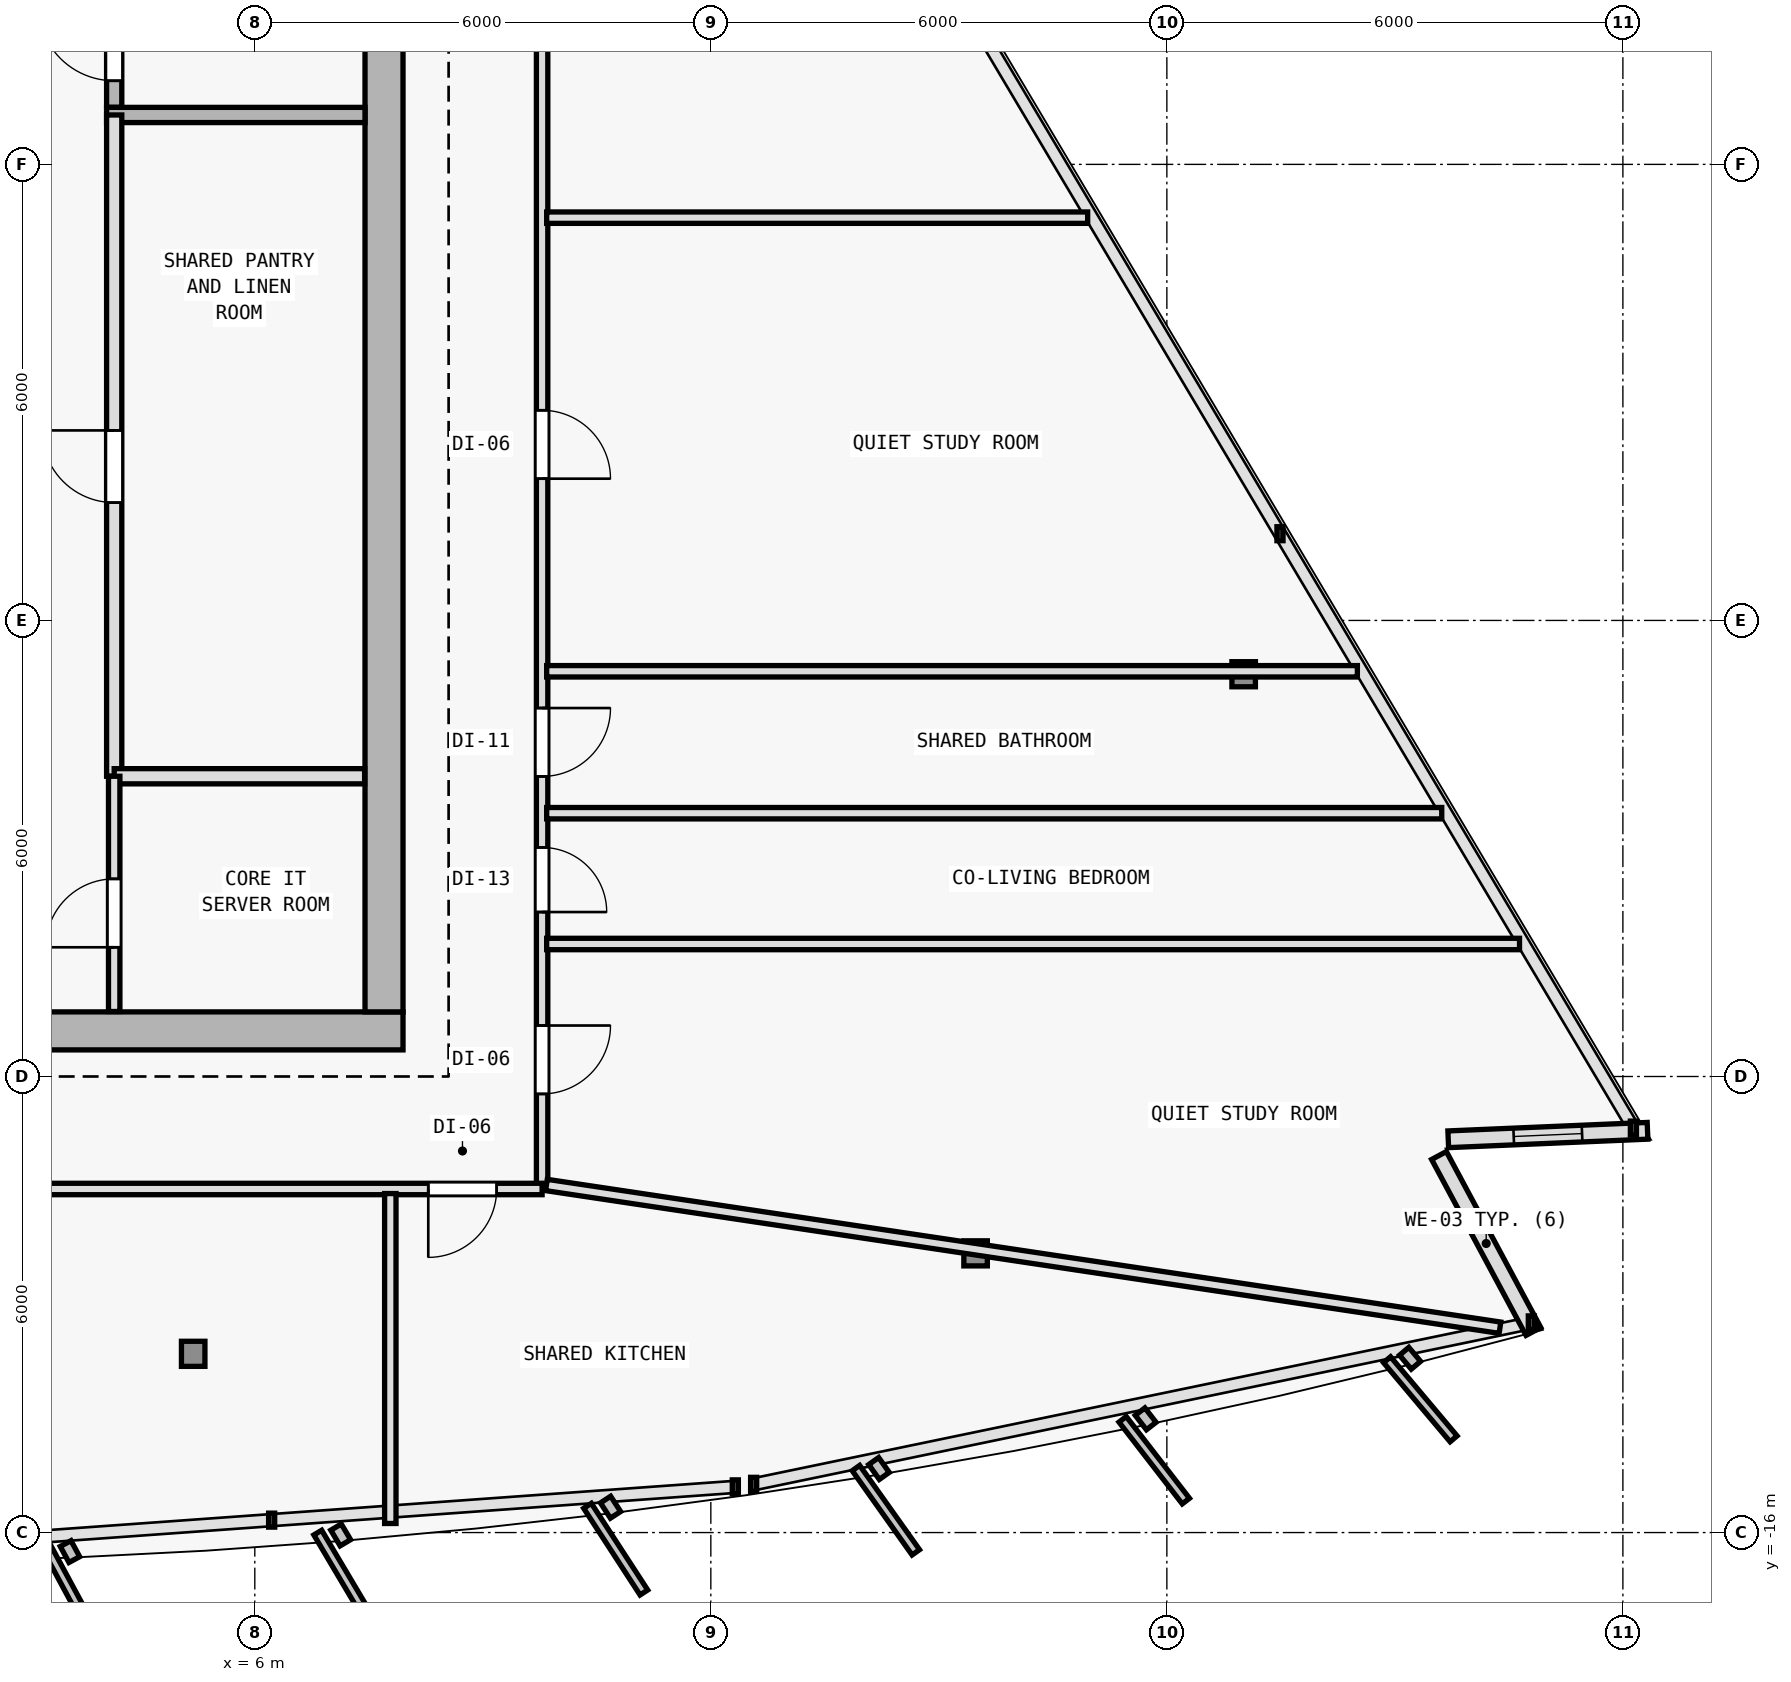
"""IFC4 building model, lengths in metres.
Left out: names, types, materials, properties, quantities, classifications, styles, units other than length and angle.
Written with IfcOpenShell. Run it as: python <this file> out.ifc"""

import sys

from ifc_helpers import new_model, si_unit, direction, frame, frame_2d, origin, origin_2d, place, context, subcontext, project, spatial, rectangle, i_section, extrude, element, fill, save


model = new_model("IFC4")
c1 = context("Model", 3, precision=1e-05, world=origin(), true_north=direction((0.0, 1.0)))
c2 = subcontext(c1, "Body", "Model", "MODEL_VIEW")
j1 = project(units=[si_unit("LENGTHUNIT", "METRE"), si_unit("PLANEANGLEUNIT", "RADIAN")], contexts=[c1])
p1 = place(None, origin())
s1 = spatial("IfcSite", under=j1, at=p1, CompositionType="ELEMENT")
p2 = place(p1, origin())
s2 = spatial("IfcBuilding", under=s1, at=p2, CompositionType="ELEMENT")
p3 = place(p2, frame((0.0, 0.0, 272.4)))
s3 = spatial("IfcBuildingStorey", under=s2, at=p3, CompositionType="ELEMENT", Elevation=272.4)
for number, where, z_axis, x_axis in (
    (1, (7.7, -9.4, 0.0), (0.0, 0.0, 1.0), (1.0, 0.0, 0.0)),
    (2, (7.7, 0.4, 0.0), (0.0, 0.0, 1.0), (1.0, 0.0, 0.0)),
):
    element("IfcColumn", number, at=place(p3, frame(where, z_axis=z_axis, x_axis=x_axis)), inside=s3, PredefinedType="COLUMN", context=c2, shape_type="SweptSolid", body=[
        extrude(i_section(OverallWidth=0.374, OverallDepth=0.372, WebThickness=0.012, FlangeThickness=0.02, FilletRadius=0.015, at=origin_2d()), origin(), (0.0, 0.0, 1.0), 3.6),
    ])
p4 = place(p3, frame((5.189, -13.648, 0.006), z_axis=(-0.006866308162, 0.0352833063, 0.999353762243), x_axis=(-0.981585848295, -0.191021523464, 0.0)))
e3 = element("IfcColumn", 3, at=p4, inside=s3, PredefinedType="COLUMN", context=c2, shape_type="SweptSolid", body=[
    extrude(i_section(OverallWidth=0.309, OverallDepth=0.33, WebThickness=0.011, FlangeThickness=0.019, FilletRadius=0.027, at=origin_2d()), origin(), (0.0, 0.0, 1.0), 3.591),
])
p5 = place(p3, frame((15.483, -12.327, 0.006), z_axis=(-0.020596292833, 0.033511459955, 0.999226087917), x_axis=(-0.851954850327, -0.523615252838, 0.0)))
e4 = element("IfcColumn", 4, at=p5, inside=s3, PredefinedType="COLUMN", context=c2, shape_type="SweptSolid", body=[
    extrude(i_section(OverallWidth=0.309, OverallDepth=0.33, WebThickness=0.011, FlangeThickness=0.019, FilletRadius=0.027, at=origin_2d()), origin(), (0.0, 0.0, 1.0), 3.592),
])
p6 = place(p3, frame((19.01, -4.708, 0.006), z_axis=(-0.026107436898, 0.021620221181, 0.999425318758), x_axis=(-0.637813971185, -0.770190455771, 0.0)))
e5 = element("IfcColumn", 5, at=p6, inside=s3, PredefinedType="COLUMN", context=c2, shape_type="SweptSolid", body=[
    extrude(i_section(OverallWidth=0.309, OverallDepth=0.33, WebThickness=0.011, FlangeThickness=0.019, FilletRadius=0.027, at=origin_2d()), origin(), (0.0, 0.0, 1.0), 3.591),
])
p7 = place(p3, frame((21.581, -11.04, 0.0), z_axis=(0.0, 0.0, 1.0), x_axis=(0.472791303324, -0.881174434208, 0.0)))
e6 = element("IfcWall", 6, at=p7, inside=s3, PredefinedType="SOLIDWALL", context=c2, shape_type="SweptSolid", body=[
    extrude(rectangle(XDim=2.627, YDim=0.22, at=frame_2d((1.313, 0.0))), origin(), (0.0, 0.0, 1.0), 3.35),
])
p8 = place(p3, frame((24.324, -10.714, 0.0), z_axis=(0.0, 0.0, 1.0), x_axis=(-0.999095924753, -0.042512740932, 0.0)))
e7 = element("IfcWall", 7, at=p8, inside=s3, PredefinedType="SOLIDWALL", context=c2, shape_type="SweptSolid", body=[
    extrude(rectangle(XDim=2.625, YDim=0.22, at=frame_2d((1.312, 0.0))), origin(), (0.0, 0.0, 1.0), 3.35),
])
p9 = place(p8, frame((0.862, 0.0, 0.62)))
e8 = element("IfcOpeningElement", 8, at=p9, cuts=e7, PredefinedType="OPENING", context=c2, shape_type="SweptSolid", body=[
    extrude(rectangle(XDim=0.9, YDim=1.6, at=frame_2d((0.45, 0.8))), frame((0.0, 0.12, 0.0), z_axis=(0.0, -1.0, 0.0), x_axis=(1.0, 0.0, 0.0)), (0.0, 0.0, 1.0), 0.24),
])
p10 = place(p3, frame((-7.95, -9.4, 0.0), z_axis=(0.0, 0.0, 1.0), x_axis=(1.0, 0.0, 0.0)))
e9 = element("IfcWall", 9, at=p10, inside=s3, PredefinedType="SHEAR", context=c2, shape_type="SweptSolid", body=[
    extrude(rectangle(XDim=15.9, YDim=0.5, at=frame_2d((7.95, 0.0))), origin(), (0.0, 0.0, 1.0), 3.35),
])
p11 = place(p10, frame((9.6, 0.0, 0.0)))
e10 = element("IfcOpeningElement", 10, at=p11, cuts=e9, PredefinedType="OPENING", context=c2, shape_type="SweptSolid", body=[
    extrude(rectangle(XDim=1.5, YDim=2.2, at=frame_2d((0.75, 1.1))), frame((0.0, 0.26, 0.0), z_axis=(0.0, -1.0, 0.0), x_axis=(1.0, 0.0, 0.0)), (0.0, 0.0, 1.0), 0.52),
])
p12 = place(p3, frame((7.7, 9.95, 0.0), z_axis=(0.0, 0.0, 1.0), x_axis=(0.0, -1.0, 0.0)))
e11 = element("IfcWall", 11, at=p12, inside=s3, PredefinedType="SHEAR", context=c2, shape_type="SweptSolid", body=[
    extrude(rectangle(XDim=19.1, YDim=0.5, at=frame_2d((9.55, 0.0))), origin(), (0.0, 0.0, 1.0), 3.35),
])
p13 = place(p3, frame((4.15, 2.75, 0.0), z_axis=(0.0, 0.0, 1.0), x_axis=(0.0, 1.0, 0.0)))
e12 = element("IfcWall", 12, at=p13, inside=s3, PredefinedType="SOLIDWALL", context=c2, shape_type="SweptSolid", body=[
    extrude(rectangle(XDim=7.2, YDim=0.2, at=frame_2d((3.6, 0.0))), origin(), (0.0, 0.0, 1.0), 3.35),
])
p14 = place(p13, frame((0.35, 0.0, 0.0)))
e13 = element("IfcOpeningElement", 13, at=p14, cuts=e12, PredefinedType="OPENING", context=c2, shape_type="SweptSolid", body=[
    extrude(rectangle(XDim=1.0, YDim=2.15, at=frame_2d((0.5, 1.075))), frame((0.0, 0.11, 0.0), z_axis=(0.0, -1.0, 0.0), x_axis=(1.0, 0.0, 0.0)), (0.0, 0.0, 1.0), 0.22),
])
p15 = place(p3, frame((4.05, 2.65, 0.0), z_axis=(0.0, 0.0, 1.0), x_axis=(1.0, 0.0, 0.0)))
e14 = element("IfcWall", 14, at=p15, inside=s3, PredefinedType="SOLIDWALL", context=c2, shape_type="SweptSolid", body=[
    extrude(rectangle(XDim=3.4, YDim=0.2, at=frame_2d((1.7, 0.0))), origin(), (0.0, 0.0, 1.0), 3.35),
])
p16 = place(p3, frame((4.15, -6.05, 0.0), z_axis=(0.0, 0.0, 1.0), x_axis=(0.0, 1.0, 0.0)))
e15 = element("IfcWall", 15, at=p16, inside=s3, PredefinedType="SOLIDWALL", context=c2, shape_type="SweptSolid", body=[
    extrude(rectangle(XDim=8.7, YDim=0.2, at=frame_2d((4.35, 0.0))), origin(), (0.0, 0.0, 1.0), 3.35),
])
p17 = place(p16, frame((3.6, 0.0, 0.0)))
e16 = element("IfcOpeningElement", 16, at=p17, cuts=e15, PredefinedType="OPENING", context=c2, shape_type="SweptSolid", body=[
    extrude(rectangle(XDim=0.95, YDim=2.1, at=frame_2d((0.475, 1.05))), frame((0.0, 0.11, 0.0), z_axis=(0.0, -1.0, 0.0), x_axis=(1.0, 0.0, 0.0)), (0.0, 0.0, 1.0), 0.22),
])
p18 = place(p3, frame((4.15, -6.05, 0.0), z_axis=(0.0, 0.0, 1.0), x_axis=(1.0, 0.0, 0.0)))
e17 = element("IfcWall", 17, at=p18, inside=s3, PredefinedType="SOLIDWALL", context=c2, shape_type="SweptSolid", body=[
    extrude(rectangle(XDim=3.295, YDim=0.2, at=frame_2d((1.647, 0.0))), origin(), (0.0, 0.0, 1.0), 3.35),
])
p19 = place(p3, frame((4.15, -9.145, 0.0), z_axis=(0.0, 0.0, 1.0), x_axis=(0.0, 1.0, 0.0)))
e18 = element("IfcWall", 18, at=p19, inside=s3, PredefinedType="PARTITIONING", context=c2, shape_type="SweptSolid", body=[
    extrude(rectangle(XDim=3.095, YDim=0.15, at=frame_2d((1.547, 0.0))), origin(), (0.0, 0.0, 1.0), 3.35),
])
p20 = place(p19, frame((0.845, 0.0, 0.0)))
e19 = element("IfcOpeningElement", 19, at=p20, cuts=e18, PredefinedType="OPENING", context=c2, shape_type="SweptSolid", body=[
    extrude(rectangle(XDim=0.9, YDim=2.1, at=frame_2d((0.45, 1.05))), frame((0.0, 0.085, 0.0), z_axis=(0.0, -1.0, 0.0), x_axis=(1.0, 0.0, 0.0)), (0.0, 0.0, 1.0), 0.17),
])
p21 = place(p3, frame((9.78, 8.226, 0.0), z_axis=(0.0, 0.0, 1.0), x_axis=(0.0, -1.0, 0.0)))
e20 = element("IfcWall", 20, at=p21, inside=s3, PredefinedType="PARTITIONING", context=c2, shape_type="SweptSolid", body=[
    extrude(rectangle(XDim=19.706, YDim=0.15, at=frame_2d((9.853, 0.0))), origin(), (0.0, 0.0, 1.0), 2.875),
])
p22 = place(p21, frame((17.555, 0.0, 0.0)))
e21 = element("IfcOpeningElement", 21, at=p22, cuts=e20, PredefinedType="OPENING", context=c2, shape_type="SweptSolid", body=[
    extrude(rectangle(XDim=0.9, YDim=2.1, at=frame_2d((0.45, 1.05))), frame((0.0, 0.085, 0.0), z_axis=(0.0, -1.0, 0.0), x_axis=(1.0, 0.0, 0.0)), (0.0, 0.0, 1.0), 0.17),
])
p23 = place(p21, frame((15.212, 0.0, 0.0)))
e22 = element("IfcOpeningElement", 22, at=p23, cuts=e20, PredefinedType="OPENING", context=c2, shape_type="SweptSolid", body=[
    extrude(rectangle(XDim=0.85, YDim=2.1, at=frame_2d((0.425, 1.05))), frame((0.0, 0.085, 0.0), z_axis=(0.0, -1.0, 0.0), x_axis=(1.0, 0.0, 0.0)), (0.0, 0.0, 1.0), 0.17),
])
p24 = place(p21, frame((13.378, 0.0, 0.0)))
e23 = element("IfcOpeningElement", 23, at=p24, cuts=e20, PredefinedType="OPENING", context=c2, shape_type="SweptSolid", body=[
    extrude(rectangle(XDim=0.9, YDim=2.1, at=frame_2d((0.45, 1.05))), frame((0.0, 0.085, 0.0), z_axis=(0.0, -1.0, 0.0), x_axis=(1.0, 0.0, 0.0)), (0.0, 0.0, 1.0), 0.17),
])
p25 = place(p21, frame((9.461, 0.0, 0.0)))
e24 = element("IfcOpeningElement", 24, at=p25, cuts=e20, PredefinedType="OPENING", context=c2, shape_type="SweptSolid", body=[
    extrude(rectangle(XDim=0.9, YDim=2.1, at=frame_2d((0.45, 1.05))), frame((0.0, 0.085, 0.0), z_axis=(0.0, -1.0, 0.0), x_axis=(1.0, 0.0, 0.0)), (0.0, 0.0, 1.0), 0.17),
])
p26 = place(p21, frame((3.103, 0.0, 0.0)))
e25 = element("IfcOpeningElement", 25, at=p26, cuts=e20, PredefinedType="OPENING", context=c2, shape_type="SweptSolid", body=[
    extrude(rectangle(XDim=0.9, YDim=2.1, at=frame_2d((0.45, 1.05))), frame((0.0, 0.085, 0.0), z_axis=(0.0, -1.0, 0.0), x_axis=(1.0, 0.0, 0.0)), (0.0, 0.0, 1.0), 0.17),
])
p27 = place(p3, frame((9.78, -11.48, 0.0), z_axis=(0.0, 0.0, 1.0), x_axis=(-1.0, 0.0, 0.0)))
e26 = element("IfcWall", 26, at=p27, inside=s3, PredefinedType="PARTITIONING", context=c2, shape_type="SweptSolid", body=[
    extrude(rectangle(XDim=19.56, YDim=0.15, at=frame_2d((9.78, 0.0))), origin(), (0.0, 0.0, 1.0), 2.775),
])
p28 = place(p27, frame((16.719, 0.0, 0.0)))
e27 = element("IfcOpeningElement", 27, at=p28, cuts=e26, PredefinedType="OPENING", context=c2, shape_type="SweptSolid", body=[
    extrude(rectangle(XDim=0.9, YDim=2.1, at=frame_2d((0.45, 1.05))), frame((0.0, 0.085, 0.0), z_axis=(0.0, -1.0, 0.0), x_axis=(1.0, 0.0, 0.0)), (0.0, 0.0, 1.0), 0.17),
])
p29 = place(p27, frame((8.027, 0.0, 0.0)))
e28 = element("IfcOpeningElement", 28, at=p29, cuts=e26, PredefinedType="OPENING", context=c2, shape_type="SweptSolid", body=[
    extrude(rectangle(XDim=0.9, YDim=2.1, at=frame_2d((0.45, 1.05))), frame((0.0, 0.085, 0.0), z_axis=(0.0, -1.0, 0.0), x_axis=(1.0, 0.0, 0.0)), (0.0, 0.0, 1.0), 0.17),
])
p30 = place(p27, frame((0.598, 0.0, 0.0)))
e29 = element("IfcOpeningElement", 29, at=p30, cuts=e26, PredefinedType="OPENING", context=c2, shape_type="SweptSolid", body=[
    extrude(rectangle(XDim=0.9, YDim=2.1, at=frame_2d((0.45, 1.05))), frame((0.0, 0.085, 0.0), z_axis=(0.0, -1.0, 0.0), x_axis=(1.0, 0.0, 0.0)), (0.0, 0.0, 1.0), 0.17),
])
p31 = place(p3, frame((9.837, -11.427, 0.0), z_axis=(0.0, 0.0, 1.0), x_axis=(0.988987677607, -0.147997883568, 0.0)))
e30 = element("IfcWall", 30, at=p31, inside=s3, PredefinedType="PARTITIONING", context=c2, shape_type="SweptSolid", body=[
    extrude(rectangle(XDim=12.686, YDim=0.15, at=frame_2d((6.343, 0.0))), origin(), (0.0, 0.0, 1.0), 2.925),
])
p32 = place(p3, frame((9.84, -4.669, 0.0), z_axis=(0.0, 0.0, 1.0), x_axis=(1.0, 0.0, 0.0)))
e31 = element("IfcWall", 31, at=p32, inside=s3, PredefinedType="PARTITIONING", context=c2, shape_type="SweptSolid", body=[
    extrude(rectangle(XDim=10.667, YDim=0.15, at=frame_2d((5.333, 0.0))), origin(), (0.0, 0.0, 1.0), 2.875),
])
p33 = place(p3, frame((9.84, -8.257, 0.0), z_axis=(0.0, 0.0, 1.0), x_axis=(1.0, 0.0, 0.0)))
e32 = element("IfcWall", 32, at=p33, inside=s3, PredefinedType="PARTITIONING", context=c2, shape_type="SweptSolid", body=[
    extrude(rectangle(XDim=12.8, YDim=0.15, at=frame_2d((6.4, 0.0))), origin(), (0.0, 0.0, 1.0), 2.875),
])
p34 = place(p3, frame((7.783, -11.54, 0.0), z_axis=(0.0, 0.0, 1.0), x_axis=(0.0, -1.0, 0.0)))
e33 = element("IfcWall", 33, at=p34, inside=s3, PredefinedType="PARTITIONING", context=c2, shape_type="SweptSolid", body=[
    extrude(rectangle(XDim=4.341, YDim=0.15, at=frame_2d((2.17, 0.0))), origin(), (0.0, 0.0, 1.0), 2.925),
])
p35 = place(p3, frame((9.84, -6.536, 0.0), z_axis=(0.0, 0.0, 1.0), x_axis=(1.0, 0.0, 0.0)))
e34 = element("IfcWall", 34, at=p35, inside=s3, PredefinedType="PARTITIONING", context=c2, shape_type="SweptSolid", body=[
    extrude(rectangle(XDim=11.777, YDim=0.15, at=frame_2d((5.888, 0.0))), origin(), (0.0, 0.0, 1.0), 2.875),
])
p36 = place(p3, frame((9.84, 1.299, 0.0), z_axis=(0.0, 0.0, 1.0), x_axis=(1.0, 0.0, 0.0)))
e35 = element("IfcWall", 35, at=p36, inside=s3, PredefinedType="PARTITIONING", context=c2, shape_type="SweptSolid", body=[
    extrude(rectangle(XDim=7.118, YDim=0.15, at=frame_2d((3.559, 0.0))), origin(), (0.0, 0.0, 1.0), 2.995),
])
p37 = place(p9, origin())
e36 = element("IfcWindow", 36, at=p37, inside=s3, PartitioningType="SINGLE_PANEL", PredefinedType="WINDOW", context=c2, shape_type="SweptSolid", body=[
    extrude(rectangle(XDim=0.9, YDim=1.6, at=frame_2d((0.45, 0.8))), frame((0.0, 0.03, 0.0), z_axis=(0.0, -1.0, 0.0), x_axis=(1.0, 0.0, 0.0)), (0.0, 0.0, 1.0), 0.06),
])
fill(e8, e36)
p38 = place(p14, origin())
e37 = element("IfcDoor", 37, at=p38, inside=s3, OperationType="SINGLE_SWING_RIGHT", PredefinedType="DOOR", context=c2, shape_type="SweptSolid", body=[
    extrude(rectangle(XDim=1.0, YDim=2.15, at=frame_2d((0.5, 1.075))), frame((0.0, 0.025, 0.0), z_axis=(0.0, -1.0, 0.0), x_axis=(1.0, 0.0, 0.0)), (0.0, 0.0, 1.0), 0.05),
])
fill(e13, e37)
p39 = place(p17, origin())
e38 = element("IfcDoor", 38, at=p39, inside=s3, OperationType="SINGLE_SWING_RIGHT", PredefinedType="DOOR", context=c2, shape_type="SweptSolid", body=[
    extrude(rectangle(XDim=0.95, YDim=2.1, at=frame_2d((0.475, 1.05))), frame((0.0, 0.025, 0.0), z_axis=(0.0, -1.0, 0.0), x_axis=(1.0, 0.0, 0.0)), (0.0, 0.0, 1.0), 0.05),
])
fill(e16, e38)
p40 = place(p20, origin())
e39 = element("IfcDoor", 39, at=p40, inside=s3, OperationType="SINGLE_SWING_LEFT", PredefinedType="DOOR", context=c2, shape_type="SweptSolid", body=[
    extrude(rectangle(XDim=0.9, YDim=2.1, at=frame_2d((0.45, 1.05))), frame((0.0, 0.025, 0.0), z_axis=(0.0, -1.0, 0.0), x_axis=(1.0, 0.0, 0.0)), (0.0, 0.0, 1.0), 0.05),
])
fill(e19, e39)
p41 = place(p30, origin())
e40 = element("IfcDoor", 40, at=p41, inside=s3, OperationType="SINGLE_SWING_RIGHT", PredefinedType="DOOR", context=c2, shape_type="SweptSolid", body=[
    extrude(rectangle(XDim=0.9, YDim=2.1, at=frame_2d((0.45, 1.05))), frame((0.0, 0.025, 0.0), z_axis=(0.0, -1.0, 0.0), x_axis=(1.0, 0.0, 0.0)), (0.0, 0.0, 1.0), 0.05),
])
fill(e29, e40)
p42 = place(p22, origin())
e41 = element("IfcDoor", 41, at=p42, inside=s3, OperationType="SINGLE_SWING_LEFT", PredefinedType="DOOR", context=c2, shape_type="SweptSolid", body=[
    extrude(rectangle(XDim=0.9, YDim=2.1, at=frame_2d((0.45, 1.05))), frame((0.0, 0.025, 0.0), z_axis=(0.0, -1.0, 0.0), x_axis=(1.0, 0.0, 0.0)), (0.0, 0.0, 1.0), 0.05),
])
fill(e21, e41)
p43 = place(p23, origin())
e42 = element("IfcDoor", 42, at=p43, inside=s3, OperationType="SINGLE_SWING_RIGHT", PredefinedType="DOOR", context=c2, shape_type="SweptSolid", body=[
    extrude(rectangle(XDim=0.85, YDim=2.1, at=frame_2d((0.425, 1.05))), frame((0.0, 0.025, 0.0), z_axis=(0.0, -1.0, 0.0), x_axis=(1.0, 0.0, 0.0)), (0.0, 0.0, 1.0), 0.05),
])
fill(e22, e42)
p44 = place(p24, origin())
e43 = element("IfcDoor", 43, at=p44, inside=s3, OperationType="SINGLE_SWING_LEFT", PredefinedType="DOOR", context=c2, shape_type="SweptSolid", body=[
    extrude(rectangle(XDim=0.9, YDim=2.1, at=frame_2d((0.45, 1.05))), frame((0.0, 0.025, 0.0), z_axis=(0.0, -1.0, 0.0), x_axis=(1.0, 0.0, 0.0)), (0.0, 0.0, 1.0), 0.05),
])
fill(e23, e43)
p45 = place(p25, origin())
e44 = element("IfcDoor", 44, at=p45, inside=s3, OperationType="SINGLE_SWING_RIGHT", PredefinedType="DOOR", context=c2, shape_type="SweptSolid", body=[
    extrude(rectangle(XDim=0.9, YDim=2.1, at=frame_2d((0.45, 1.05))), frame((0.0, 0.025, 0.0), z_axis=(0.0, -1.0, 0.0), x_axis=(1.0, 0.0, 0.0)), (0.0, 0.0, 1.0), 0.05),
])
fill(e24, e44)
save(model, sys.argv[1])
